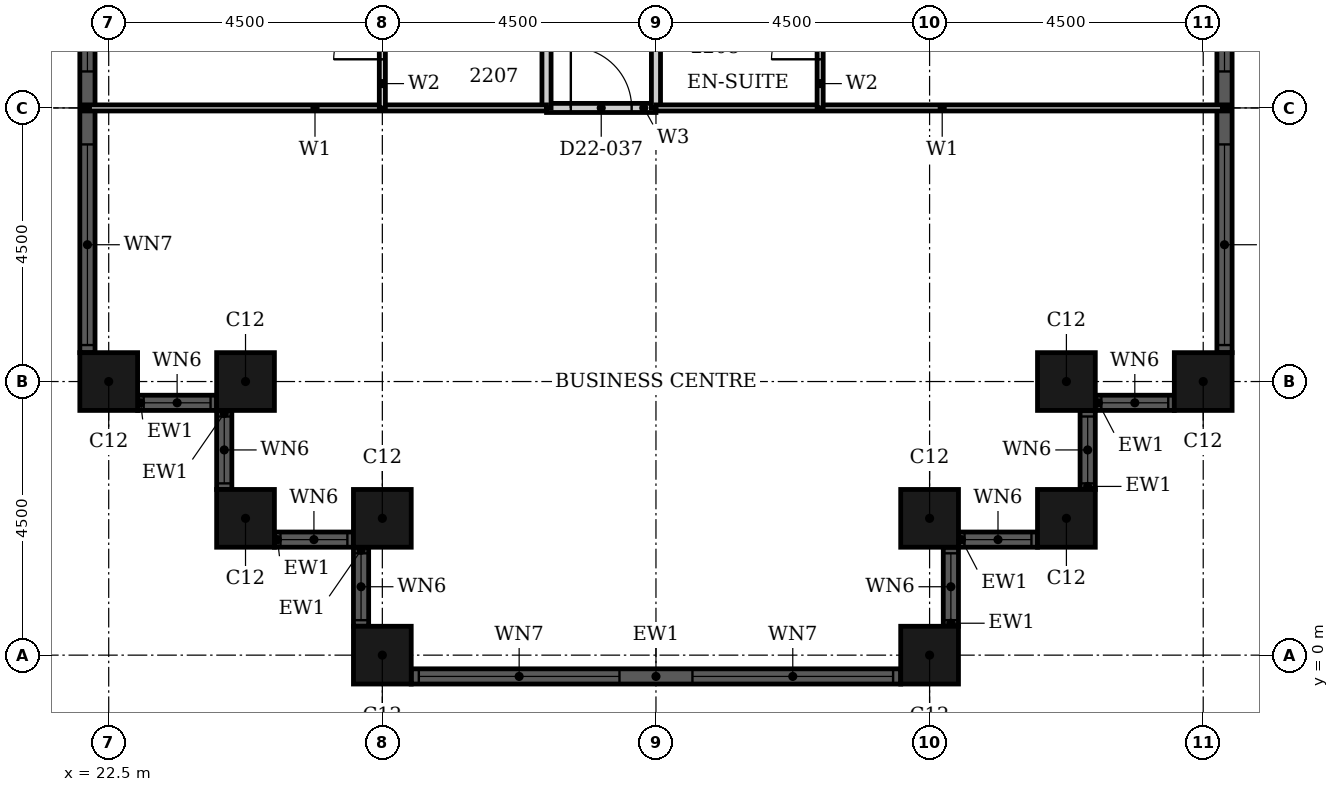
"""IFC4 building model, lengths in metres.
Left out: names, types, materials, properties, quantities, classifications, styles, units other than length and angle.
Written with IfcOpenShell. Run it as: python <this file> out.ifc"""

import sys

from ifc_helpers import new_model, si_unit, direction, frame, frame_2d, origin, origin_2d, place, context, subcontext, project, spatial, rectangle, hollow_rectangle, extrude, element, fill, save


model = new_model("IFC4")
c1 = context("Model", 3, precision=1e-05, world=origin(), true_north=direction((0.0, 1.0)))
c2 = subcontext(c1, "Body", "Model", "MODEL_VIEW")
j1 = project(units=[si_unit("LENGTHUNIT", "METRE"), si_unit("PLANEANGLEUNIT", "RADIAN")], contexts=[c1])
p1 = place(None, origin())
s1 = spatial("IfcSite", under=j1, at=p1, CompositionType="ELEMENT")
p2 = place(p1, origin())
s2 = spatial("IfcBuilding", under=s1, at=p2, CompositionType="ELEMENT")
p3 = place(p2, frame((0.0, 0.0, 92.4)))
s3 = spatial("IfcBuildingStorey", under=s2, at=p3, CompositionType="ELEMENT", Elevation=92.4)
for number, where, z_axis, x_axis in (
    (1, (22.5, 4.5, 0.0), (0.0, 0.0, 1.0), (1.0, 0.0, 0.0)),
    (2, (24.75, 4.5, 0.0), (0.0, 0.0, 1.0), (1.0, 0.0, 0.0)),
    (3, (24.75, 2.25, 0.0), (0.0, 0.0, 1.0), (1.0, 0.0, 0.0)),
    (4, (27.0, 2.25, 0.0), (0.0, 0.0, 1.0), (1.0, 0.0, 0.0)),
    (5, (27.0, 0.0, 0.0), (0.0, 0.0, 1.0), (1.0, 0.0, 0.0)),
    (6, (36.0, 0.0, 0.0), (0.0, 0.0, 1.0), (1.0, 0.0, 0.0)),
    (7, (36.0, 2.25, 0.0), (0.0, 0.0, 1.0), (1.0, 0.0, 0.0)),
    (8, (38.25, 2.25, 0.0), (0.0, 0.0, 1.0), (1.0, 0.0, 0.0)),
    (9, (38.25, 4.5, 0.0), (0.0, 0.0, 1.0), (1.0, 0.0, 0.0)),
    (10, (40.5, 4.5, 0.0), (0.0, 0.0, 1.0), (1.0, 0.0, 0.0)),
):
    element("IfcColumn", number, at=place(p3, frame(where, z_axis=z_axis, x_axis=x_axis)), inside=s3, PredefinedType="COLUMN", context=c2, shape_type="SweptSolid", body=[
        extrude(hollow_rectangle(XDim=0.95, YDim=0.95, WallThickness=0.03, at=origin_2d()), origin(), (0.0, 0.0, 1.0), 3.6),
    ])
p4 = place(p3, frame((22.975, 4.15, 0.0), z_axis=(0.0, 0.0, 1.0), x_axis=(1.0, 0.0, 0.0)))
e11 = element("IfcWall", 11, at=p4, inside=s3, PredefinedType="SOLIDWALL", context=c2, shape_type="SweptSolid", body=[
    extrude(rectangle(XDim=1.3, YDim=0.25, at=frame_2d((0.65, 0.0))), origin(), (0.0, 0.0, 1.0), 3.6),
])
p5 = place(p4, frame((0.1, 0.0, 0.9)))
e12 = element("IfcOpeningElement", 12, at=p5, cuts=e11, PredefinedType="OPENING", context=c2, shape_type="SweptSolid", body=[
    extrude(rectangle(XDim=1.1, YDim=1.85, at=frame_2d((0.55, 0.925))), frame((0.0, 0.135, 0.0), z_axis=(0.0, -1.0, 0.0), x_axis=(1.0, 0.0, 0.0)), (0.0, 0.0, 1.0), 0.27),
])
p6 = place(p3, frame((24.4, 4.025, 0.0), z_axis=(0.0, 0.0, 1.0), x_axis=(0.0, -1.0, 0.0)))
e13 = element("IfcWall", 13, at=p6, inside=s3, PredefinedType="SOLIDWALL", context=c2, shape_type="SweptSolid", body=[
    extrude(rectangle(XDim=1.3, YDim=0.25, at=frame_2d((0.65, 0.0))), origin(), (0.0, 0.0, 1.0), 3.6),
])
p7 = place(p6, frame((0.1, 0.0, 0.9)))
e14 = element("IfcOpeningElement", 14, at=p7, cuts=e13, PredefinedType="OPENING", context=c2, shape_type="SweptSolid", body=[
    extrude(rectangle(XDim=1.1, YDim=1.85, at=frame_2d((0.55, 0.925))), frame((0.0, 0.135, 0.0), z_axis=(0.0, -1.0, 0.0), x_axis=(1.0, 0.0, 0.0)), (0.0, 0.0, 1.0), 0.27),
])
p8 = place(p3, frame((25.225, 1.9, 0.0), z_axis=(0.0, 0.0, 1.0), x_axis=(1.0, 0.0, 0.0)))
e15 = element("IfcWall", 15, at=p8, inside=s3, PredefinedType="SOLIDWALL", context=c2, shape_type="SweptSolid", body=[
    extrude(rectangle(XDim=1.3, YDim=0.25, at=frame_2d((0.65, 0.0))), origin(), (0.0, 0.0, 1.0), 3.6),
])
p9 = place(p8, frame((0.1, 0.0, 0.9)))
e16 = element("IfcOpeningElement", 16, at=p9, cuts=e15, PredefinedType="OPENING", context=c2, shape_type="SweptSolid", body=[
    extrude(rectangle(XDim=1.1, YDim=1.85, at=frame_2d((0.55, 0.925))), frame((0.0, 0.135, 0.0), z_axis=(0.0, -1.0, 0.0), x_axis=(1.0, 0.0, 0.0)), (0.0, 0.0, 1.0), 0.27),
])
p10 = place(p3, frame((26.65, 1.775, 0.0), z_axis=(0.0, 0.0, 1.0), x_axis=(0.0, -1.0, 0.0)))
e17 = element("IfcWall", 17, at=p10, inside=s3, PredefinedType="SOLIDWALL", context=c2, shape_type="SweptSolid", body=[
    extrude(rectangle(XDim=1.3, YDim=0.25, at=frame_2d((0.65, 0.0))), origin(), (0.0, 0.0, 1.0), 3.6),
])
p11 = place(p10, frame((0.1, 0.0, 0.9)))
e18 = element("IfcOpeningElement", 18, at=p11, cuts=e17, PredefinedType="OPENING", context=c2, shape_type="SweptSolid", body=[
    extrude(rectangle(XDim=1.1, YDim=1.85, at=frame_2d((0.55, 0.925))), frame((0.0, 0.135, 0.0), z_axis=(0.0, -1.0, 0.0), x_axis=(1.0, 0.0, 0.0)), (0.0, 0.0, 1.0), 0.27),
])
p12 = place(p3, frame((27.475, -0.35, 0.0), z_axis=(0.0, 0.0, 1.0), x_axis=(1.0, 0.0, 0.0)))
e19 = element("IfcWall", 19, at=p12, inside=s3, PredefinedType="SOLIDWALL", context=c2, shape_type="SweptSolid", body=[
    extrude(rectangle(XDim=8.05, YDim=0.25, at=frame_2d((4.025, 0.0))), origin(), (0.0, 0.0, 1.0), 3.6),
])
p13 = place(p12, frame((0.125, 0.0, 0.9)))
e20 = element("IfcOpeningElement", 20, at=p13, cuts=e19, PredefinedType="OPENING", context=c2, shape_type="SweptSolid", body=[
    extrude(rectangle(XDim=3.3, YDim=1.85, at=frame_2d((1.65, 0.925))), frame((0.0, 0.135, 0.0), z_axis=(0.0, -1.0, 0.0), x_axis=(1.0, 0.0, 0.0)), (0.0, 0.0, 1.0), 0.27),
])
p14 = place(p12, frame((4.625, 0.0, 0.9)))
e21 = element("IfcOpeningElement", 21, at=p14, cuts=e19, PredefinedType="OPENING", context=c2, shape_type="SweptSolid", body=[
    extrude(rectangle(XDim=3.3, YDim=1.85, at=frame_2d((1.65, 0.925))), frame((0.0, 0.135, 0.0), z_axis=(0.0, -1.0, 0.0), x_axis=(1.0, 0.0, 0.0)), (0.0, 0.0, 1.0), 0.27),
])
p15 = place(p3, frame((36.35, 0.475, 0.0), z_axis=(0.0, 0.0, 1.0), x_axis=(0.0, 1.0, 0.0)))
e22 = element("IfcWall", 22, at=p15, inside=s3, PredefinedType="SOLIDWALL", context=c2, shape_type="SweptSolid", body=[
    extrude(rectangle(XDim=1.3, YDim=0.25, at=frame_2d((0.65, 0.0))), origin(), (0.0, 0.0, 1.0), 3.6),
])
p16 = place(p15, frame((0.1, 0.0, 0.9)))
e23 = element("IfcOpeningElement", 23, at=p16, cuts=e22, PredefinedType="OPENING", context=c2, shape_type="SweptSolid", body=[
    extrude(rectangle(XDim=1.1, YDim=1.85, at=frame_2d((0.55, 0.925))), frame((0.0, 0.135, 0.0), z_axis=(0.0, -1.0, 0.0), x_axis=(1.0, 0.0, 0.0)), (0.0, 0.0, 1.0), 0.27),
])
p17 = place(p3, frame((36.475, 1.9, 0.0), z_axis=(0.0, 0.0, 1.0), x_axis=(1.0, 0.0, 0.0)))
e24 = element("IfcWall", 24, at=p17, inside=s3, PredefinedType="SOLIDWALL", context=c2, shape_type="SweptSolid", body=[
    extrude(rectangle(XDim=1.3, YDim=0.25, at=frame_2d((0.65, 0.0))), origin(), (0.0, 0.0, 1.0), 3.6),
])
p18 = place(p17, frame((0.1, 0.0, 0.9)))
e25 = element("IfcOpeningElement", 25, at=p18, cuts=e24, PredefinedType="OPENING", context=c2, shape_type="SweptSolid", body=[
    extrude(rectangle(XDim=1.1, YDim=1.85, at=frame_2d((0.55, 0.925))), frame((0.0, 0.135, 0.0), z_axis=(0.0, -1.0, 0.0), x_axis=(1.0, 0.0, 0.0)), (0.0, 0.0, 1.0), 0.27),
])
p19 = place(p3, frame((38.6, 2.725, 0.0), z_axis=(0.0, 0.0, 1.0), x_axis=(0.0, 1.0, 0.0)))
e26 = element("IfcWall", 26, at=p19, inside=s3, PredefinedType="SOLIDWALL", context=c2, shape_type="SweptSolid", body=[
    extrude(rectangle(XDim=1.3, YDim=0.25, at=frame_2d((0.65, 0.0))), origin(), (0.0, 0.0, 1.0), 3.6),
])
p20 = place(p19, frame((0.1, 0.0, 0.9)))
e27 = element("IfcOpeningElement", 27, at=p20, cuts=e26, PredefinedType="OPENING", context=c2, shape_type="SweptSolid", body=[
    extrude(rectangle(XDim=1.1, YDim=1.85, at=frame_2d((0.55, 0.925))), frame((0.0, 0.135, 0.0), z_axis=(0.0, -1.0, 0.0), x_axis=(1.0, 0.0, 0.0)), (0.0, 0.0, 1.0), 0.27),
])
p21 = place(p3, frame((38.725, 4.15, 0.0), z_axis=(0.0, 0.0, 1.0), x_axis=(1.0, 0.0, 0.0)))
e28 = element("IfcWall", 28, at=p21, inside=s3, PredefinedType="SOLIDWALL", context=c2, shape_type="SweptSolid", body=[
    extrude(rectangle(XDim=1.3, YDim=0.25, at=frame_2d((0.65, 0.0))), origin(), (0.0, 0.0, 1.0), 3.6),
])
p22 = place(p21, frame((0.1, 0.0, 0.9)))
e29 = element("IfcOpeningElement", 29, at=p22, cuts=e28, PredefinedType="OPENING", context=c2, shape_type="SweptSolid", body=[
    extrude(rectangle(XDim=1.1, YDim=1.85, at=frame_2d((0.55, 0.925))), frame((0.0, 0.135, 0.0), z_axis=(0.0, -1.0, 0.0), x_axis=(1.0, 0.0, 0.0)), (0.0, 0.0, 1.0), 0.27),
])
p23 = place(p3, frame((40.85, 4.975, 0.0), z_axis=(0.0, 0.0, 1.0), x_axis=(0.0, 1.0, 0.0)))
e30 = element("IfcWall", 30, at=p23, inside=s3, PredefinedType="SOLIDWALL", context=c2, shape_type="SweptSolid", body=[
    extrude(rectangle(XDim=8.05, YDim=0.25, at=frame_2d((4.025, 0.0))), origin(), (0.0, 0.0, 1.0), 3.6),
])
p24 = place(p23, frame((0.125, 0.0, 0.9)))
e31 = element("IfcOpeningElement", 31, at=p24, cuts=e30, PredefinedType="OPENING", context=c2, shape_type="SweptSolid", body=[
    extrude(rectangle(XDim=3.3, YDim=1.85, at=frame_2d((1.65, 0.925))), frame((0.0, 0.135, 0.0), z_axis=(0.0, -1.0, 0.0), x_axis=(1.0, 0.0, 0.0)), (0.0, 0.0, 1.0), 0.27),
])
p25 = place(p23, frame((4.625, 0.0, 0.9)))
e32 = element("IfcOpeningElement", 32, at=p25, cuts=e30, PredefinedType="OPENING", context=c2, shape_type="SweptSolid", body=[
    extrude(rectangle(XDim=3.3, YDim=1.85, at=frame_2d((1.65, 0.925))), frame((0.0, 0.135, 0.0), z_axis=(0.0, -1.0, 0.0), x_axis=(1.0, 0.0, 0.0)), (0.0, 0.0, 1.0), 0.27),
])
p26 = place(p3, frame((22.15, 13.025, 0.0), z_axis=(0.0, 0.0, 1.0), x_axis=(0.0, -1.0, 0.0)))
e33 = element("IfcWall", 33, at=p26, inside=s3, PredefinedType="SOLIDWALL", context=c2, shape_type="SweptSolid", body=[
    extrude(rectangle(XDim=8.05, YDim=0.25, at=frame_2d((4.025, 0.0))), origin(), (0.0, 0.0, 1.0), 3.6),
])
p27 = place(p26, frame((0.125, 0.0, 0.9)))
e34 = element("IfcOpeningElement", 34, at=p27, cuts=e33, PredefinedType="OPENING", context=c2, shape_type="SweptSolid", body=[
    extrude(rectangle(XDim=3.3, YDim=1.85, at=frame_2d((1.65, 0.925))), frame((0.0, 0.135, 0.0), z_axis=(0.0, -1.0, 0.0), x_axis=(1.0, 0.0, 0.0)), (0.0, 0.0, 1.0), 0.27),
])
p28 = place(p26, frame((4.625, 0.0, 0.9)))
e35 = element("IfcOpeningElement", 35, at=p28, cuts=e33, PredefinedType="OPENING", context=c2, shape_type="SweptSolid", body=[
    extrude(rectangle(XDim=3.3, YDim=1.85, at=frame_2d((1.65, 0.925))), frame((0.0, 0.135, 0.0), z_axis=(0.0, -1.0, 0.0), x_axis=(1.0, 0.0, 0.0)), (0.0, 0.0, 1.0), 0.27),
])
p29 = place(p3, frame((29.7, 9.0, 0.0), z_axis=(0.0, 0.0, 1.0), x_axis=(1.0, 0.0, 0.0)))
e36 = element("IfcWall", 36, at=p29, inside=s3, PredefinedType="PARTITIONING", context=c2, shape_type="SweptSolid", body=[
    extrude(rectangle(XDim=1.8, YDim=0.15, at=frame_2d((0.9, 0.0))), origin(), (0.0, 0.0, 1.0), 3.2),
])
p30 = place(p29, frame((0.4, 0.0, 0.0)))
e37 = element("IfcOpeningElement", 37, at=p30, cuts=e36, PredefinedType="OPENING", context=c2, shape_type="SweptSolid", body=[
    extrude(rectangle(XDim=1.0, YDim=2.1, at=frame_2d((0.5, 1.05))), frame((0.0, 0.085, 0.0), z_axis=(0.0, -1.0, 0.0), x_axis=(1.0, 0.0, 0.0)), (0.0, 0.0, 1.0), 0.17),
])
p31 = place(p3, frame((29.7, 9.0, 0.0), z_axis=(0.0, 0.0, 1.0), x_axis=(0.0, 1.0, 0.0)))
e38 = element("IfcWall", 38, at=p31, inside=s3, PredefinedType="PARTITIONING", context=c2, shape_type="SweptSolid", body=[
    extrude(rectangle(XDim=11.7, YDim=0.15, at=frame_2d((5.85, 0.0))), origin(), (0.0, 0.0, 1.0), 3.2),
])
p32 = place(p31, frame((2.95, 0.0, 0.0)))
e39 = element("IfcOpeningElement", 39, at=p32, cuts=e38, PredefinedType="OPENING", context=c2, shape_type="SweptSolid", body=[
    extrude(rectangle(XDim=1.0, YDim=2.1, at=frame_2d((0.5, 1.05))), frame((0.0, 0.085, 0.0), z_axis=(0.0, -1.0, 0.0), x_axis=(1.0, 0.0, 0.0)), (0.0, 0.0, 1.0), 0.17),
])
p33 = place(p3, frame((31.5, 9.0, 0.0), z_axis=(0.0, 0.0, 1.0), x_axis=(0.0, 1.0, 0.0)))
e40 = element("IfcWall", 40, at=p33, inside=s3, PredefinedType="PARTITIONING", context=c2, shape_type="SweptSolid", body=[
    extrude(rectangle(XDim=11.7, YDim=0.15, at=frame_2d((5.85, 0.0))), origin(), (0.0, 0.0, 1.0), 2.48),
])
p34 = place(p33, frame((2.95, 0.0, 0.0)))
e41 = element("IfcOpeningElement", 41, at=p34, cuts=e40, PredefinedType="OPENING", context=c2, shape_type="SweptSolid", body=[
    extrude(rectangle(XDim=1.0, YDim=2.1, at=frame_2d((0.5, 1.05))), frame((0.0, 0.085, 0.0), z_axis=(0.0, -1.0, 0.0), x_axis=(1.0, 0.0, 0.0)), (0.0, 0.0, 1.0), 0.17),
])
p35 = place(p3, frame((31.5, 9.0, 0.0), z_axis=(0.0, 0.0, 1.0), x_axis=(1.0, 0.0, 0.0)))
e42 = element("IfcWall", 42, at=p35, inside=s3, PredefinedType="PARTITIONING", context=c2, shape_type="SweptSolid", body=[
    extrude(rectangle(XDim=9.415, YDim=0.1, at=frame_2d((4.708, 0.0))), origin(), (0.0, 0.0, 1.0), 3.2),
])
p36 = place(p3, frame((22.085, 9.0, 0.0), z_axis=(0.0, 0.0, 1.0), x_axis=(1.0, 0.0, 0.0)))
e43 = element("IfcWall", 43, at=p36, inside=s3, PredefinedType="PARTITIONING", context=c2, shape_type="SweptSolid", body=[
    extrude(rectangle(XDim=7.615, YDim=0.1, at=frame_2d((3.808, 0.0))), origin(), (0.0, 0.0, 1.0), 3.2),
])
p37 = place(p3, frame((27.0, 9.0, 0.0), z_axis=(0.0, 0.0, 1.0), x_axis=(0.0, 1.0, 0.0)))
e44 = element("IfcWall", 44, at=p37, inside=s3, PredefinedType="PARTITIONING", context=c2, shape_type="SweptSolid", body=[
    extrude(rectangle(XDim=2.4, YDim=0.1, at=frame_2d((1.2, 0.0))), origin(), (0.0, 0.0, 1.0), 2.48),
])
p38 = place(p37, frame((0.8, 0.0, 0.0)))
e45 = element("IfcOpeningElement", 45, at=p38, cuts=e44, PredefinedType="OPENING", context=c2, shape_type="SweptSolid", body=[
    extrude(rectangle(XDim=0.8, YDim=2.1, at=frame_2d((0.4, 1.05))), frame((0.0, 0.06, 0.0), z_axis=(0.0, -1.0, 0.0), x_axis=(1.0, 0.0, 0.0)), (0.0, 0.0, 1.0), 0.12),
])
p39 = place(p3, frame((34.2, 9.0, 0.0), z_axis=(0.0, 0.0, 1.0), x_axis=(0.0, 1.0, 0.0)))
e46 = element("IfcWall", 46, at=p39, inside=s3, PredefinedType="PARTITIONING", context=c2, shape_type="SweptSolid", body=[
    extrude(rectangle(XDim=2.4, YDim=0.1, at=frame_2d((1.2, 0.0))), origin(), (0.0, 0.0, 1.0), 3.2),
])
p40 = place(p39, frame((0.8, 0.0, 0.0)))
e47 = element("IfcOpeningElement", 47, at=p40, cuts=e46, PredefinedType="OPENING", context=c2, shape_type="SweptSolid", body=[
    extrude(rectangle(XDim=0.8, YDim=2.1, at=frame_2d((0.4, 1.05))), frame((0.0, 0.06, 0.0), z_axis=(0.0, -1.0, 0.0), x_axis=(1.0, 0.0, 0.0)), (0.0, 0.0, 1.0), 0.12),
])
p41 = place(p5, origin())
e48 = element("IfcWindow", 48, at=p41, inside=s3, PartitioningType="SINGLE_PANEL", PredefinedType="WINDOW", context=c2, shape_type="SweptSolid", body=[
    extrude(rectangle(XDim=1.1, YDim=1.85, at=frame_2d((0.55, 0.925))), frame((0.0, 0.03, 0.0), z_axis=(0.0, -1.0, 0.0), x_axis=(1.0, 0.0, 0.0)), (0.0, 0.0, 1.0), 0.06),
])
fill(e12, e48)
p42 = place(p7, origin())
e49 = element("IfcWindow", 49, at=p42, inside=s3, PartitioningType="SINGLE_PANEL", PredefinedType="WINDOW", context=c2, shape_type="SweptSolid", body=[
    extrude(rectangle(XDim=1.1, YDim=1.85, at=frame_2d((0.55, 0.925))), frame((0.0, 0.03, 0.0), z_axis=(0.0, -1.0, 0.0), x_axis=(1.0, 0.0, 0.0)), (0.0, 0.0, 1.0), 0.06),
])
fill(e14, e49)
p43 = place(p9, origin())
e50 = element("IfcWindow", 50, at=p43, inside=s3, PartitioningType="SINGLE_PANEL", PredefinedType="WINDOW", context=c2, shape_type="SweptSolid", body=[
    extrude(rectangle(XDim=1.1, YDim=1.85, at=frame_2d((0.55, 0.925))), frame((0.0, 0.03, 0.0), z_axis=(0.0, -1.0, 0.0), x_axis=(1.0, 0.0, 0.0)), (0.0, 0.0, 1.0), 0.06),
])
fill(e16, e50)
p44 = place(p11, origin())
e51 = element("IfcWindow", 51, at=p44, inside=s3, PartitioningType="SINGLE_PANEL", PredefinedType="WINDOW", context=c2, shape_type="SweptSolid", body=[
    extrude(rectangle(XDim=1.1, YDim=1.85, at=frame_2d((0.55, 0.925))), frame((0.0, 0.03, 0.0), z_axis=(0.0, -1.0, 0.0), x_axis=(1.0, 0.0, 0.0)), (0.0, 0.0, 1.0), 0.06),
])
fill(e18, e51)
p45 = place(p13, origin())
e52 = element("IfcWindow", 52, at=p45, inside=s3, PartitioningType="SINGLE_PANEL", PredefinedType="WINDOW", context=c2, shape_type="SweptSolid", body=[
    extrude(rectangle(XDim=3.3, YDim=1.85, at=frame_2d((1.65, 0.925))), frame((0.0, 0.03, 0.0), z_axis=(0.0, -1.0, 0.0), x_axis=(1.0, 0.0, 0.0)), (0.0, 0.0, 1.0), 0.06),
])
fill(e20, e52)
p46 = place(p14, origin())
e53 = element("IfcWindow", 53, at=p46, inside=s3, PartitioningType="SINGLE_PANEL", PredefinedType="WINDOW", context=c2, shape_type="SweptSolid", body=[
    extrude(rectangle(XDim=3.3, YDim=1.85, at=frame_2d((1.65, 0.925))), frame((0.0, 0.03, 0.0), z_axis=(0.0, -1.0, 0.0), x_axis=(1.0, 0.0, 0.0)), (0.0, 0.0, 1.0), 0.06),
])
fill(e21, e53)
p47 = place(p16, origin())
e54 = element("IfcWindow", 54, at=p47, inside=s3, PartitioningType="SINGLE_PANEL", PredefinedType="WINDOW", context=c2, shape_type="SweptSolid", body=[
    extrude(rectangle(XDim=1.1, YDim=1.85, at=frame_2d((0.55, 0.925))), frame((0.0, 0.03, 0.0), z_axis=(0.0, -1.0, 0.0), x_axis=(1.0, 0.0, 0.0)), (0.0, 0.0, 1.0), 0.06),
])
fill(e23, e54)
p48 = place(p18, origin())
e55 = element("IfcWindow", 55, at=p48, inside=s3, PartitioningType="SINGLE_PANEL", PredefinedType="WINDOW", context=c2, shape_type="SweptSolid", body=[
    extrude(rectangle(XDim=1.1, YDim=1.85, at=frame_2d((0.55, 0.925))), frame((0.0, 0.03, 0.0), z_axis=(0.0, -1.0, 0.0), x_axis=(1.0, 0.0, 0.0)), (0.0, 0.0, 1.0), 0.06),
])
fill(e25, e55)
p49 = place(p20, origin())
e56 = element("IfcWindow", 56, at=p49, inside=s3, PartitioningType="SINGLE_PANEL", PredefinedType="WINDOW", context=c2, shape_type="SweptSolid", body=[
    extrude(rectangle(XDim=1.1, YDim=1.85, at=frame_2d((0.55, 0.925))), frame((0.0, 0.03, 0.0), z_axis=(0.0, -1.0, 0.0), x_axis=(1.0, 0.0, 0.0)), (0.0, 0.0, 1.0), 0.06),
])
fill(e27, e56)
p50 = place(p22, origin())
e57 = element("IfcWindow", 57, at=p50, inside=s3, PartitioningType="SINGLE_PANEL", PredefinedType="WINDOW", context=c2, shape_type="SweptSolid", body=[
    extrude(rectangle(XDim=1.1, YDim=1.85, at=frame_2d((0.55, 0.925))), frame((0.0, 0.03, 0.0), z_axis=(0.0, -1.0, 0.0), x_axis=(1.0, 0.0, 0.0)), (0.0, 0.0, 1.0), 0.06),
])
fill(e29, e57)
p51 = place(p24, origin())
e58 = element("IfcWindow", 58, at=p51, inside=s3, PartitioningType="SINGLE_PANEL", PredefinedType="WINDOW", context=c2, shape_type="SweptSolid", body=[
    extrude(rectangle(XDim=3.3, YDim=1.85, at=frame_2d((1.65, 0.925))), frame((0.0, 0.03, 0.0), z_axis=(0.0, -1.0, 0.0), x_axis=(1.0, 0.0, 0.0)), (0.0, 0.0, 1.0), 0.06),
])
fill(e31, e58)
p52 = place(p25, origin())
e59 = element("IfcWindow", 59, at=p52, inside=s3, PartitioningType="SINGLE_PANEL", PredefinedType="WINDOW", context=c2, shape_type="SweptSolid", body=[
    extrude(rectangle(XDim=3.3, YDim=1.85, at=frame_2d((1.65, 0.925))), frame((0.0, 0.03, 0.0), z_axis=(0.0, -1.0, 0.0), x_axis=(1.0, 0.0, 0.0)), (0.0, 0.0, 1.0), 0.06),
])
fill(e32, e59)
p53 = place(p27, origin())
e60 = element("IfcWindow", 60, at=p53, inside=s3, PartitioningType="SINGLE_PANEL", PredefinedType="WINDOW", context=c2, shape_type="SweptSolid", body=[
    extrude(rectangle(XDim=3.3, YDim=1.85, at=frame_2d((1.65, 0.925))), frame((0.0, 0.03, 0.0), z_axis=(0.0, -1.0, 0.0), x_axis=(1.0, 0.0, 0.0)), (0.0, 0.0, 1.0), 0.06),
])
fill(e34, e60)
p54 = place(p28, origin())
e61 = element("IfcWindow", 61, at=p54, inside=s3, PartitioningType="SINGLE_PANEL", PredefinedType="WINDOW", context=c2, shape_type="SweptSolid", body=[
    extrude(rectangle(XDim=3.3, YDim=1.85, at=frame_2d((1.65, 0.925))), frame((0.0, 0.03, 0.0), z_axis=(0.0, -1.0, 0.0), x_axis=(1.0, 0.0, 0.0)), (0.0, 0.0, 1.0), 0.06),
])
fill(e35, e61)
p55 = place(p38, origin())
e62 = element("IfcDoor", 62, at=p55, inside=s3, OperationType="SINGLE_SWING_LEFT", PredefinedType="DOOR", context=c2, shape_type="SweptSolid", body=[
    extrude(rectangle(XDim=0.8, YDim=2.1, at=frame_2d((0.4, 1.05))), frame((0.0, 0.025, 0.0), z_axis=(0.0, -1.0, 0.0), x_axis=(1.0, 0.0, 0.0)), (0.0, 0.0, 1.0), 0.05),
])
fill(e45, e62)
p56 = place(p40, origin())
e63 = element("IfcDoor", 63, at=p56, inside=s3, OperationType="SINGLE_SWING_LEFT", PredefinedType="DOOR", context=c2, shape_type="SweptSolid", body=[
    extrude(rectangle(XDim=0.8, YDim=2.1, at=frame_2d((0.4, 1.05))), frame((0.0, 0.025, 0.0), z_axis=(0.0, -1.0, 0.0), x_axis=(1.0, 0.0, 0.0)), (0.0, 0.0, 1.0), 0.05),
])
fill(e47, e63)
p57 = place(p30, origin())
e64 = element("IfcDoor", 64, at=p57, inside=s3, OperationType="SINGLE_SWING_LEFT", PredefinedType="DOOR", context=c2, shape_type="SweptSolid", body=[
    extrude(rectangle(XDim=1.0, YDim=2.1, at=frame_2d((0.5, 1.05))), frame((0.0, 0.025, 0.0), z_axis=(0.0, -1.0, 0.0), x_axis=(1.0, 0.0, 0.0)), (0.0, 0.0, 1.0), 0.05),
])
fill(e37, e64)
save(model, sys.argv[1])
